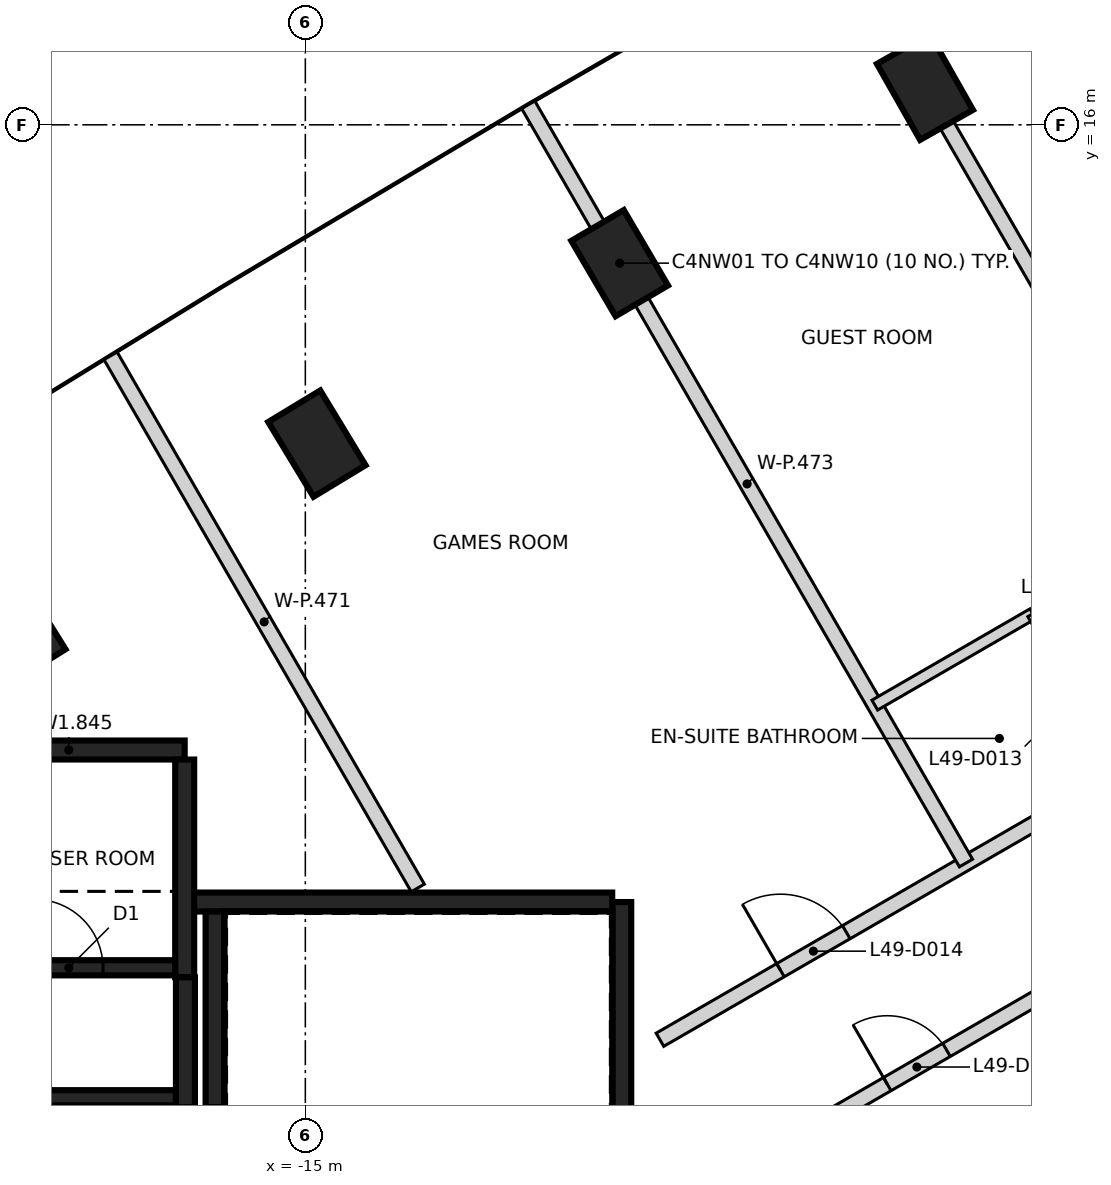
"""IFC4 building model, lengths in metres.
Left out: names, types, materials, properties, quantities, classifications, styles, units other than length and angle.
Written with IfcOpenShell. Run it as: python <this file> out.ifc"""

import sys

from ifc_helpers import new_model, si_unit, direction, frame, frame_2d, origin, origin_2d, place, context, subcontext, project, spatial, rectangle, extrude, element, fill, save


model = new_model("IFC4")
c1 = context("Model", 3, precision=1e-05, world=origin(), true_north=direction((0.0, 1.0)))
c2 = subcontext(c1, "Body", "Model", "MODEL_VIEW")
j1 = project(units=[si_unit("LENGTHUNIT", "METRE"), si_unit("PLANEANGLEUNIT", "RADIAN")], contexts=[c1])
p1 = place(None, origin())
s1 = spatial("IfcSite", under=j1, at=p1, CompositionType="ELEMENT")
p2 = place(p1, origin())
s2 = spatial("IfcBuilding", under=s1, at=p2, CompositionType="ELEMENT")
p3 = place(p2, frame((0.0, 0.0, 197.2)))
s3 = spatial("IfcBuildingStorey", under=s2, at=p3, CompositionType="ELEMENT", Elevation=197.2)
for number, where, z_axis, x_axis in (
    (1, (-6.848, 16.499, -0.35), (0.0, 0.0, 1.0), (-0.494, 0.87, 0.0)),
    (2, (-10.864, 14.18, -0.35), (0.0, 0.0, 1.0), (-0.506, 0.862, 0.0)),
    (3, (-14.848, 11.806, -0.35), (0.0, 0.0, 1.0), (-0.518, 0.855, 0.0)),
    (4, (-18.799, 9.376, -0.35), (0.0, 0.0, 1.0), (-0.529, 0.848, 0.0)),
):
    element("IfcColumn", number, at=place(p3, frame(where, z_axis=z_axis, x_axis=x_axis)), inside=s3, PredefinedType="COLUMN", context=c2, shape_type="SweptSolid", body=[
        extrude(rectangle(XDim=1.15, YDim=0.8, at=origin_2d()), origin(), (0.0, 0.0, 1.0), 3.6),
    ])
p4 = place(p3, frame((-10.837, 5.775, 0.0), z_axis=(0.0, 0.0, 1.0), x_axis=(0.0, -1.0, 0.0)))
e5 = element("IfcWall", 5, at=p4, inside=s3, PredefinedType="SHEAR", context=c2, shape_type="SweptSolid", body=[
    extrude(rectangle(XDim=11.55, YDim=0.25, at=frame_2d((5.775, 0.0))), origin(), (0.0, 0.0, 1.0), 3.25),
])
p5 = place(p4, frame((10.025, 0.0, 0.0)))
e6 = element("IfcOpeningElement", 6, at=p5, cuts=e5, PredefinedType="OPENING", context=c2, shape_type="SweptSolid", body=[
    extrude(rectangle(XDim=1.2, YDim=2.1, at=frame_2d((0.6, 1.05))), frame((0.0, 0.135, 0.0), z_axis=(0.0, -1.0, 0.0), x_axis=(1.0, 0.0, 0.0)), (0.0, 0.0, 1.0), 0.27),
])
p6 = place(p4, frame((8.725, 0.0, 0.0)))
e7 = element("IfcOpeningElement", 7, at=p6, cuts=e5, PredefinedType="OPENING", context=c2, shape_type="SweptSolid", body=[
    extrude(rectangle(XDim=1.2, YDim=2.1, at=frame_2d((0.6, 1.05))), frame((0.0, 0.135, 0.0), z_axis=(0.0, -1.0, 0.0), x_axis=(1.0, 0.0, 0.0)), (0.0, 0.0, 1.0), 0.27),
])
p7 = place(p3, frame((-16.472, 5.775, 0.0), z_axis=(0.0, 0.0, 1.0), x_axis=(1.0, 0.0, 0.0)))
e8 = element("IfcWall", 8, at=p7, inside=s3, PredefinedType="SHEAR", context=c2, shape_type="SweptSolid", body=[
    extrude(rectangle(XDim=5.51, YDim=0.25, at=frame_2d((2.755, 0.0))), origin(), (0.0, 0.0, 1.0), 3.25),
])
p8 = place(p3, frame((-19.637, 7.775, 0.0), z_axis=(0.0, 0.0, 1.0), x_axis=(1.0, 0.0, 0.0)))
e9 = element("IfcWall", 9, at=p8, inside=s3, PredefinedType="SHEAR", context=c2, shape_type="SweptSolid", body=[
    extrude(rectangle(XDim=3.05, YDim=0.25, at=frame_2d((1.525, 0.0))), origin(), (0.0, 0.0, 1.0), 3.25),
])
p9 = place(p3, frame((-16.587, 7.65, 0.0), z_axis=(0.0, 0.0, 1.0), x_axis=(0.0, -1.0, 0.0)))
e10 = element("IfcWall", 10, at=p9, inside=s3, PredefinedType="SHEAR", context=c2, shape_type="SweptSolid", body=[
    extrude(rectangle(XDim=2.865, YDim=0.25, at=frame_2d((1.432, 0.0))), origin(), (0.0, 0.0, 1.0), 3.25),
])
p10 = place(p3, frame((-16.187, 3.075, 0.0), z_axis=(0.0, 0.0, 1.0), x_axis=(0.0, 1.0, 0.0)))
e11 = element("IfcWall", 11, at=p10, inside=s3, PredefinedType="SHEAR", context=c2, shape_type="SweptSolid", body=[
    extrude(rectangle(XDim=2.575, YDim=0.25, at=frame_2d((1.287, 0.0))), origin(), (0.0, 0.0, 1.0), 3.25),
])
p11 = place(p3, frame((-16.577, 4.785, 0.0), z_axis=(0.0, 0.0, 1.0), x_axis=(0.0, -1.0, 0.0)))
e12 = element("IfcWall", 12, at=p11, inside=s3, PredefinedType="SHEAR", context=c2, shape_type="SweptSolid", body=[
    extrude(rectangle(XDim=1.71, YDim=0.25, at=frame_2d((0.855, 0.0))), origin(), (0.0, 0.0, 1.0), 3.25),
])
p12 = place(p3, frame((-19.511, 4.91, 0.0), z_axis=(0.0, 0.0, 1.0), x_axis=(1.0, 0.0, 0.0)))
e13 = element("IfcWall", 13, at=p12, inside=s3, PredefinedType="SHEAR", context=c2, shape_type="SweptSolid", body=[
    extrude(rectangle(XDim=2.798, YDim=0.2, at=frame_2d((1.399, 0.0))), origin(), (0.0, 0.0, 1.0), 3.25),
])
p13 = place(p12, frame((0.949, 0.0, 0.0)))
e14 = element("IfcOpeningElement", 14, at=p13, cuts=e13, PredefinedType="OPENING", context=c2, shape_type="SweptSolid", body=[
    extrude(rectangle(XDim=0.9, YDim=2.1, at=frame_2d((0.45, 1.05))), frame((0.0, 0.11, 0.0), z_axis=(0.0, -1.0, 0.0), x_axis=(1.0, 0.0, 0.0)), (0.0, 0.0, 1.0), 0.22),
])
p14 = place(p3, frame((-19.462, 3.2, 0.0), z_axis=(0.0, 0.0, 1.0), x_axis=(1.0, 0.0, 0.0)))
e15 = element("IfcWall", 15, at=p14, inside=s3, PredefinedType="SHEAR", context=c2, shape_type="SweptSolid", body=[
    extrude(rectangle(XDim=2.759, YDim=0.2, at=frame_2d((1.379, 0.0))), origin(), (0.0, 0.0, 1.0), 3.25),
])
p15 = place(p3, frame((-10.334, 3.963, 0.0), z_axis=(0.0, 0.0, 1.0), x_axis=(0.866013159114, 0.500021207791, 0.0)))
e16 = element("IfcWall", 16, at=p15, inside=s3, PredefinedType="PARTITIONING", context=c2, shape_type="SweptSolid", body=[
    extrude(rectangle(XDim=11.931, YDim=0.2, at=frame_2d((5.966, 0.0))), origin(), (0.0, 0.0, 1.0), 3.25),
])
p16 = place(p15, frame((10.103, 0.0, 0.0)))
e17 = element("IfcOpeningElement", 17, at=p16, cuts=e16, PredefinedType="OPENING", context=c2, shape_type="SweptSolid", body=[
    extrude(rectangle(XDim=1.0, YDim=2.1, at=frame_2d((0.5, 1.05))), frame((0.0, 0.11, 0.0), z_axis=(0.0, -1.0, 0.0), x_axis=(1.0, 0.0, 0.0)), (0.0, 0.0, 1.0), 0.22),
])
p17 = place(p15, frame((8.149, 0.0, 0.0)))
e18 = element("IfcOpeningElement", 18, at=p17, cuts=e16, PredefinedType="OPENING", context=c2, shape_type="SweptSolid", body=[
    extrude(rectangle(XDim=0.95, YDim=2.1, at=frame_2d((0.475, 1.05))), frame((0.0, 0.11, 0.0), z_axis=(0.0, -1.0, 0.0), x_axis=(1.0, 0.0, 0.0)), (0.0, 0.0, 1.0), 0.22),
])
p18 = place(p15, frame((1.831, 0.0, 0.0)))
e19 = element("IfcOpeningElement", 19, at=p18, cuts=e16, PredefinedType="OPENING", context=c2, shape_type="SweptSolid", body=[
    extrude(rectangle(XDim=1.0, YDim=2.1, at=frame_2d((0.5, 1.05))), frame((0.0, 0.11, 0.0), z_axis=(0.0, -1.0, 0.0), x_axis=(1.0, 0.0, 0.0)), (0.0, 0.0, 1.0), 0.22),
])
p19 = place(p3, frame((-8.611, 2.648, 0.0), z_axis=(0.0, 0.0, 1.0), x_axis=(0.865953566425, 0.500124405319, 0.0)))
e20 = element("IfcWall", 20, at=p19, inside=s3, PredefinedType="PARTITIONING", context=c2, shape_type="SweptSolid", body=[
    extrude(rectangle(XDim=12.267, YDim=0.2, at=frame_2d((6.134, 0.0))), origin(), (0.0, 0.0, 1.0), 3.25),
])
p20 = place(p19, frame((9.904, 0.0, 0.0)))
e21 = element("IfcOpeningElement", 21, at=p20, cuts=e20, PredefinedType="OPENING", context=c2, shape_type="SweptSolid", body=[
    extrude(rectangle(XDim=0.9, YDim=2.1, at=frame_2d((0.45, 1.05))), frame((0.0, 0.11, 0.0), z_axis=(0.0, -1.0, 0.0), x_axis=(1.0, 0.0, 0.0)), (0.0, 0.0, 1.0), 0.22),
])
p21 = place(p19, frame((5.683, 0.0, 0.0)))
e22 = element("IfcOpeningElement", 22, at=p21, cuts=e20, PredefinedType="OPENING", context=c2, shape_type="SweptSolid", body=[
    extrude(rectangle(XDim=0.9, YDim=2.1, at=frame_2d((0.45, 1.05))), frame((0.0, 0.11, 0.0), z_axis=(0.0, -1.0, 0.0), x_axis=(1.0, 0.0, 0.0)), (0.0, 0.0, 1.0), 0.22),
])
p22 = place(p19, frame((1.463, 0.0, 0.0)))
e23 = element("IfcOpeningElement", 23, at=p22, cuts=e20, PredefinedType="OPENING", context=c2, shape_type="SweptSolid", body=[
    extrude(rectangle(XDim=0.9, YDim=2.1, at=frame_2d((0.45, 1.05))), frame((0.0, 0.11, 0.0), z_axis=(0.0, -1.0, 0.0), x_axis=(1.0, 0.0, 0.0)), (0.0, 0.0, 1.0), 0.22),
])
p23 = place(p3, frame((-17.562, 12.961, 0.0), z_axis=(0.0, 0.0, 1.0), x_axis=(0.500056194816, -0.865992957262, 0.0)))
e24 = element("IfcWall", 24, at=p23, inside=s3, PredefinedType="PARTITIONING", context=c2, shape_type="SweptSolid", body=[
    extrude(rectangle(XDim=8.084, YDim=0.2, at=frame_2d((4.042, 0.0))), origin(), (0.0, 0.0, 1.0), 2.35),
])
for number, where, z_axis, x_axis in (
    (25, (-12.067, 16.263, 0.0), (0.0, 0.0, 1.0), (0.5, -0.866, 0.0)),
    (26, (-8.052, 18.582, 0.0), (0.0, 0.0, 1.0), (0.5, -0.866, 0.0)),
):
    element("IfcWall", number, at=place(p3, frame(where, z_axis=z_axis, x_axis=x_axis)), inside=s3, PredefinedType="PARTITIONING", context=c2, shape_type="SweptSolid", body=[
        extrude(rectangle(XDim=11.519, YDim=0.2, at=frame_2d((5.759, 0.0))), origin(), (0.0, 0.0, 1.0), 3.25),
    ])
p24 = place(p3, frame((-7.599, 0.923, 0.0), z_axis=(0.0, 0.0, 1.0), x_axis=(0.865957029593, 0.500118408877, 0.0)))
e27 = element("IfcWall", 27, at=p24, inside=s3, PredefinedType="PARTITIONING", context=c2, shape_type="SweptSolid", body=[
    extrude(rectangle(XDim=12.24, YDim=0.2, at=frame_2d((6.12, 0.0))), origin(), (0.0, 0.0, 1.0), 3.25),
])
p25 = place(p3, frame((-7.508, 8.366, 0.0), z_axis=(0.0, 0.0, 1.0), x_axis=(0.865822967017, 0.500350466959, 0.0)))
e28 = element("IfcWall", 28, at=p25, inside=s3, PredefinedType="PARTITIONING", context=c2, shape_type="SweptSolid", body=[
    extrude(rectangle(XDim=2.4, YDim=0.15, at=frame_2d((1.2, 0.0))), origin(), (0.0, 0.0, 1.0), 3.25),
])
p26 = place(p3, frame((-5.43, 9.567, 0.0), z_axis=(0.0, 0.0, 1.0), x_axis=(0.499913221443, -0.866075499611, 0.0)))
e29 = element("IfcWall", 29, at=p26, inside=s3, PredefinedType="PARTITIONING", context=c2, shape_type="SweptSolid", body=[
    extrude(rectangle(XDim=2.4, YDim=0.15, at=frame_2d((1.2, 0.0))), origin(), (0.0, 0.0, 1.0), 3.25),
])
p27 = place(p26, frame((0.801, 0.0, 0.0)))
e30 = element("IfcOpeningElement", 30, at=p27, cuts=e29, PredefinedType="OPENING", context=c2, shape_type="SweptSolid", body=[
    extrude(rectangle(XDim=0.8, YDim=2.1, at=frame_2d((0.4, 1.05))), frame((0.0, 0.085, 0.0), z_axis=(0.0, -1.0, 0.0), x_axis=(1.0, 0.0, 0.0)), (0.0, 0.0, 1.0), 0.17),
])
p28 = place(p13, origin())
e31 = element("IfcDoor", 31, at=p28, inside=s3, OperationType="SINGLE_SWING_LEFT", PredefinedType="DOOR", context=c2, shape_type="SweptSolid", body=[
    extrude(rectangle(XDim=0.9, YDim=2.1, at=frame_2d((0.45, 1.05))), frame((0.0, 0.025, 0.0), z_axis=(0.0, -1.0, 0.0), x_axis=(1.0, 0.0, 0.0)), (0.0, 0.0, 1.0), 0.05),
])
fill(e14, e31)
p29 = place(p18, origin())
e32 = element("IfcDoor", 32, at=p29, inside=s3, OperationType="SINGLE_SWING_LEFT", PredefinedType="DOOR", context=c2, shape_type="SweptSolid", body=[
    extrude(rectangle(XDim=1.0, YDim=2.1, at=frame_2d((0.5, 1.05))), frame((0.0, 0.025, 0.0), z_axis=(0.0, -1.0, 0.0), x_axis=(1.0, 0.0, 0.0)), (0.0, 0.0, 1.0), 0.05),
])
fill(e19, e32)
p30 = place(p22, frame((0.9, 0.0, 0.0), z_axis=(0.0, 0.0, 1.0), x_axis=(-1.0, 0.0, 0.0)))
e33 = element("IfcDoor", 33, at=p30, inside=s3, OperationType="SINGLE_SWING_LEFT", PredefinedType="DOOR", context=c2, shape_type="SweptSolid", body=[
    extrude(rectangle(XDim=0.9, YDim=2.1, at=frame_2d((0.45, 1.05))), frame((0.0, 0.025, 0.0), z_axis=(0.0, -1.0, 0.0), x_axis=(1.0, 0.0, 0.0)), (0.0, 0.0, 1.0), 0.05),
])
fill(e23, e33)
save(model, sys.argv[1])
